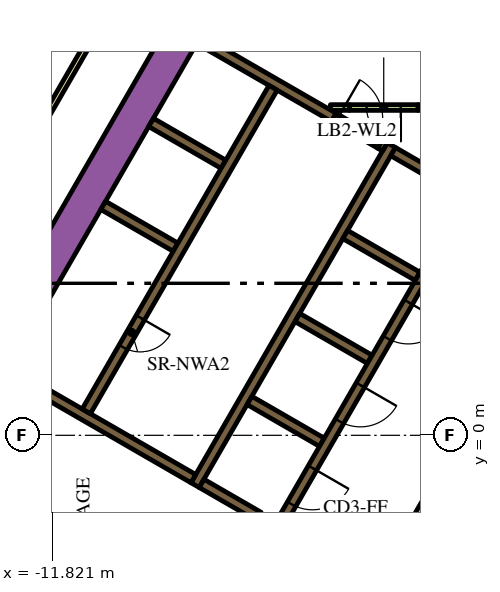
"""IFC4 building model, lengths in metres.
Left out: names, types, materials, properties, quantities, classifications, styles, units other than length and angle.
Written with IfcOpenShell. Run it as: python <this file> out.ifc"""

import sys

from ifc_helpers import new_model, si_unit, direction, frame, frame_2d, origin, place, context, subcontext, project, spatial, polyline, rectangle, outline, extrude, element, fill, save


model = new_model("IFC4")
c1 = context("Model", 3, precision=1e-05, world=origin(), true_north=direction((0.0, 1.0)))
c2 = subcontext(c1, "Body", "Model", "MODEL_VIEW")
j1 = project(units=[si_unit("LENGTHUNIT", "METRE"), si_unit("PLANEANGLEUNIT", "RADIAN")], contexts=[c1])
p1 = place(None, origin())
s1 = spatial("IfcSite", under=j1, at=p1, CompositionType="ELEMENT")
p2 = place(p1, origin())
s2 = spatial("IfcBuilding", under=s1, at=p2, CompositionType="ELEMENT")
p3 = place(p2, frame((0.0, 0.0, 70.5)))
s3 = spatial("IfcBuildingStorey", under=s2, at=p3, CompositionType="ELEMENT", Elevation=70.5)
p4 = place(p3, frame((-15.36, -1.503, 0.0), z_axis=(0.0, 0.0, 1.0), x_axis=(0.50000389221, 0.866023156604, 0.0)))
e1 = element("IfcWall", 1, at=p4, inside=s3, PredefinedType="SOLIDWALL", context=c2, shape_type="SweptSolid", body=[
    extrude(rectangle(XDim=21.0, YDim=0.9, at=frame_2d((10.5, 0.0))), origin(), (0.0, 0.0, 1.0), 3.9),
])
p5 = place(p3, frame((-8.06, -1.311, 0.0), z_axis=(0.0, 0.0, 1.0), x_axis=(0.50000273126, 0.866023826885, 0.0)))
e2 = element("IfcWall", 2, at=p5, inside=s3, PredefinedType="SOLIDWALL", context=c2, shape_type="SweptSolid", body=[
    extrude(rectangle(XDim=10.33, YDim=0.25, at=frame_2d((5.165, 0.0))), origin(), (0.0, 0.0, 1.0), 3.9),
])
p6 = place(p3, frame((-1.647, 6.771, 0.0), z_axis=(0.0, 0.0, 1.0), x_axis=(-0.865971728693, 0.500092956464, 0.0)))
e3 = element("IfcWall", 3, at=p6, inside=s3, PredefinedType="SOLIDWALL", context=c2, shape_type="SweptSolid", body=[
    extrude(rectangle(XDim=1.388, YDim=0.25, at=frame_2d((0.694, 0.0))), origin(), (0.0, 0.0, 1.0), 3.9),
])
for number, where, z_axis, x_axis in (
    (4, (-2.204, 4.182, 0.0), (0.0, 0.0, 1.0), (-0.866, 0.5, 0.0)),
    (5, (-5.369, 3.1, 0.0), (0.0, 0.0, 1.0), (0.866, -0.5, 0.0)),
    (6, (-4.724, -0.182, 0.0), (0.0, 0.0, 1.0), (-0.866, 0.5, 0.0)),
):
    element("IfcWall", number, at=place(p3, frame(where, z_axis=z_axis, x_axis=x_axis)), inside=s3, PredefinedType="SOLIDWALL", context=c2, shape_type="SweptSolid", body=[
        extrude(rectangle(XDim=2.2, YDim=0.25, at=frame_2d((1.1, 0.0))), origin(), (0.0, 0.0, 1.0), 3.9),
    ])
p7 = place(p3, frame((-7.889, -1.265, 0.0), z_axis=(0.0, 0.0, 1.0), x_axis=(0.865986741702, -0.500066958712, 0.0)))
e7 = element("IfcWall", 7, at=p7, inside=s3, PredefinedType="SOLIDWALL", context=c2, shape_type="SweptSolid", body=[
    extrude(rectangle(XDim=1.738, YDim=0.25, at=frame_2d((0.869, 0.0))), origin(), (0.0, 0.0, 1.0), 3.9),
])
p8 = place(p3, frame((-8.106, -1.14, 0.0), z_axis=(0.0, 0.0, 1.0), x_axis=(-0.866000643155, 0.500042884217, 0.0)))
e8 = element("IfcWall", 8, at=p8, inside=s3, PredefinedType="SOLIDWALL", context=c2, shape_type="SweptSolid", body=[
    extrude(rectangle(XDim=5.65, YDim=0.25, at=frame_2d((2.825, 0.0))), origin(), (0.0, 0.0, 1.0), 3.9),
])
p9 = place(p3, origin())
e9 = element("IfcWall", 9, at=p9, inside=s3, PredefinedType="SOLIDWALL", context=c2, shape_type="SweptSolid", body=[
    extrude(outline(polyline([(-3.128, 7.481), (-3.259, 7.557), (-3.134, 7.773), (-3.003, 7.698), (-3.128, 7.481)])), origin(), (0.0, 0.0, 1.0), 3.9),
])
for number, where, z_axis, x_axis in (
    (10, (-8.574, 4.95, 0.0), (0.0, 0.0, 1.0), (-0.866, 0.5, 0.0)),
    (11, (-7.314, 7.132, 0.0), (0.0, 0.0, 1.0), (-0.866, 0.5, 0.0)),
):
    element("IfcWall", number, at=place(p3, frame(where, z_axis=z_axis, x_axis=x_axis)), inside=s3, PredefinedType="SOLIDWALL", context=c2, shape_type="SweptSolid", body=[
        extrude(rectangle(XDim=2.2, YDim=0.25, at=frame_2d((1.1, 0.0))), origin(), (0.0, 0.0, 1.0), 3.9),
    ])
p10 = place(p3, frame((-7.959, 10.415, 0.0), z_axis=(0.0, 0.0, 1.0), x_axis=(0.866020958405, -0.500007699544, 0.0)))
e12 = element("IfcWall", 12, at=p10, inside=s3, PredefinedType="SOLIDWALL", context=c2, shape_type="SweptSolid", body=[
    extrude(rectangle(XDim=4.1, YDim=0.25, at=frame_2d((2.05, 0.0))), origin(), (0.0, 0.0, 1.0), 3.9),
])
p11 = place(p3, frame((-3.147, -3.718, 0.0), z_axis=(0.0, 0.0, 1.0), x_axis=(0.500010131483, 0.866019554291, 0.0)))
e13 = element("IfcWall", 13, at=p11, inside=s3, PredefinedType="PARTITIONING", context=c2, shape_type="SweptSolid", body=[
    extrude(rectangle(XDim=3.894, YDim=0.15, at=frame_2d((1.947, 0.0))), origin(), (0.0, 0.0, 1.0), 2.75),
])
p12 = place(p3, frame((-3.997, 8.625, 0.0), z_axis=(0.0, 0.0, 1.0), x_axis=(-1.0, 0.0, 0.0)))
e14 = element("IfcWall", 14, at=p12, inside=s3, PredefinedType="PARTITIONING", context=c2, shape_type="SweptSolid", body=[
    extrude(rectangle(XDim=0.502, YDim=0.15, at=frame_2d((0.251, 0.0))), origin(), (0.0, 0.0, 1.0), 2.75),
])
p13 = place(p3, frame((-2.196, 8.625, 0.0), z_axis=(0.0, 0.0, 1.0), x_axis=(1.0, 0.0, 0.0)))
e15 = element("IfcWall", 15, at=p13, inside=s3, PredefinedType="PARTITIONING", context=c2, shape_type="SweptSolid", body=[
    extrude(rectangle(XDim=1.146, YDim=0.15, at=frame_2d((0.573, 0.0))), origin(), (0.0, 0.0, 1.0), 2.75),
])
p14 = place(p3, frame((-6.008, 9.144, 0.0), z_axis=(0.0, 0.0, 1.0), x_axis=(-0.500006956611, -0.866021387346, 0.0)))
e16 = element("IfcWall", 16, at=p14, inside=s3, PredefinedType="SOLIDWALL", context=c2, shape_type="SweptSolid", body=[
    extrude(rectangle(XDim=9.83, YDim=0.25, at=frame_2d((4.915, 0.0))), origin(), (0.0, 0.0, 1.0), 3.9),
])
p15 = place(p14, frame((6.985, 0.0, 0.0)))
e17 = element("IfcOpeningElement", 17, at=p15, cuts=e16, PredefinedType="OPENING", context=c2, shape_type="SweptSolid", body=[
    extrude(rectangle(XDim=0.9, YDim=2.1, at=frame_2d((0.45, 1.05))), frame((0.0, 0.135, 0.0), z_axis=(0.0, -1.0, 0.0), x_axis=(1.0, 0.0, 0.0)), (0.0, 0.0, 1.0), 0.27),
])
p16 = place(p3, frame((-0.898, 6.194, 0.0), z_axis=(0.0, 0.0, 1.0), x_axis=(-0.499996202215, -0.866027596426, 0.0)))
e18 = element("IfcWall", 18, at=p16, inside=s3, PredefinedType="SOLIDWALL", context=c2, shape_type="SweptSolid", body=[
    extrude(rectangle(XDim=9.83, YDim=0.25, at=frame_2d((4.915, 0.0))), origin(), (0.0, 0.0, 1.0), 3.9),
])
p17 = place(p16, frame((0.585, 0.0, 0.0)))
e19 = element("IfcOpeningElement", 19, at=p17, cuts=e18, PredefinedType="OPENING", context=c2, shape_type="SweptSolid", body=[
    extrude(rectangle(XDim=1.1, YDim=2.1, at=frame_2d((0.55, 1.05))), frame((0.0, 0.135, 0.0), z_axis=(0.0, -1.0, 0.0), x_axis=(1.0, 0.0, 0.0)), (0.0, 0.0, 1.0), 0.27),
])
p18 = place(p16, frame((3.105, 0.0, 0.0)))
e20 = element("IfcOpeningElement", 20, at=p18, cuts=e18, PredefinedType="OPENING", context=c2, shape_type="SweptSolid", body=[
    extrude(rectangle(XDim=1.1, YDim=2.1, at=frame_2d((0.55, 1.05))), frame((0.0, 0.135, 0.0), z_axis=(0.0, -1.0, 0.0), x_axis=(1.0, 0.0, 0.0)), (0.0, 0.0, 1.0), 0.27),
])
p19 = place(p16, frame((5.625, 0.0, 0.0)))
e21 = element("IfcOpeningElement", 21, at=p19, cuts=e18, PredefinedType="OPENING", context=c2, shape_type="SweptSolid", body=[
    extrude(rectangle(XDim=1.1, YDim=2.1, at=frame_2d((0.55, 1.05))), frame((0.0, 0.135, 0.0), z_axis=(0.0, -1.0, 0.0), x_axis=(1.0, 0.0, 0.0)), (0.0, 0.0, 1.0), 0.27),
])
p20 = place(p16, frame((8.145, 0.0, 0.0)))
e22 = element("IfcOpeningElement", 22, at=p20, cuts=e18, PredefinedType="OPENING", context=c2, shape_type="SweptSolid", body=[
    extrude(rectangle(XDim=1.1, YDim=2.1, at=frame_2d((0.55, 1.05))), frame((0.0, 0.135, 0.0), z_axis=(0.0, -1.0, 0.0), x_axis=(1.0, 0.0, 0.0)), (0.0, 0.0, 1.0), 0.27),
])
p21 = place(p3, frame((-2.196, 8.625, 0.0), z_axis=(0.0, 0.0, 1.0), x_axis=(-1.0, 0.0, 0.0)))
e23 = element("IfcWall", 23, at=p21, inside=s3, PredefinedType="PARTITIONING", context=c2, shape_type="SweptSolid", body=[
    extrude(rectangle(XDim=1.8, YDim=0.15, at=frame_2d((0.9, 0.0))), origin(), (0.0, 0.0, 1.0), 2.75),
])
p22 = place(p21, frame((0.45, 0.0, 0.0)))
e24 = element("IfcOpeningElement", 24, at=p22, cuts=e23, PredefinedType="OPENING", context=c2, shape_type="SweptSolid", body=[
    extrude(rectangle(XDim=0.9, YDim=2.1, at=frame_2d((0.45, 1.05))), frame((0.0, 0.085, 0.0), z_axis=(0.0, -1.0, 0.0), x_axis=(1.0, 0.0, 0.0)), (0.0, 0.0, 1.0), 0.17),
])
p23 = place(p3, frame((-4.409, 8.365, 0.0), z_axis=(0.0, 0.0, 1.0), x_axis=(0.866034573852, -0.49998411664, 0.0)))
e25 = element("IfcWall", 25, at=p23, inside=s3, PredefinedType="SOLIDWALL", context=c2, shape_type="SweptSolid", body=[
    extrude(rectangle(XDim=1.4, YDim=0.25, at=frame_2d((0.7, 0.0))), origin(), (0.0, 0.0, 1.0), 3.9),
])
p24 = place(p23, frame((0.1, 0.0, 0.0)))
e26 = element("IfcOpeningElement", 26, at=p24, cuts=e25, PredefinedType="OPENING", context=c2, shape_type="SweptSolid", body=[
    extrude(rectangle(XDim=1.2, YDim=2.1, at=frame_2d((0.6, 1.05))), frame((0.0, 0.135, 0.0), z_axis=(0.0, -1.0, 0.0), x_axis=(1.0, 0.0, 0.0)), (0.0, 0.0, 1.0), 0.27),
])
p25 = place(p3, frame((-19.081, -3.9, 0.0), z_axis=(0.0, 0.0, 1.0), x_axis=(0.499998313975, 0.866026377209, 0.0)))
e27 = element("IfcWall", 27, at=p25, inside=s3, PredefinedType="PARTITIONING", context=c2, shape_type="SweptSolid", body=[
    extrude(rectangle(XDim=25.766, YDim=0.15, at=frame_2d((12.883, 0.0))), origin(), (0.0, 0.0, 1.0), 2.75),
])
p26 = place(p25, frame((24.586, 0.0, 0.0)))
e28 = element("IfcOpeningElement", 28, at=p26, cuts=e27, PredefinedType="OPENING", context=c2, shape_type="SweptSolid", body=[
    extrude(rectangle(XDim=1.0, YDim=2.1, at=frame_2d((0.5, 1.05))), frame((0.0, 0.085, 0.0), z_axis=(0.0, -1.0, 0.0), x_axis=(1.0, 0.0, 0.0)), (0.0, 0.0, 1.0), 0.17),
])
p27 = place(p25, frame((9.948, 0.0, 0.0)))
e29 = element("IfcOpeningElement", 29, at=p27, cuts=e27, PredefinedType="OPENING", context=c2, shape_type="SweptSolid", body=[
    extrude(rectangle(XDim=1.0, YDim=2.1, at=frame_2d((0.5, 1.05))), frame((0.0, 0.085, 0.0), z_axis=(0.0, -1.0, 0.0), x_axis=(1.0, 0.0, 0.0)), (0.0, 0.0, 1.0), 0.17),
])
p28 = place(p25, frame((7.782, 0.0, 0.0)))
e30 = element("IfcOpeningElement", 30, at=p28, cuts=e27, PredefinedType="OPENING", context=c2, shape_type="SweptSolid", body=[
    extrude(rectangle(XDim=0.9, YDim=2.1, at=frame_2d((0.45, 1.05))), frame((0.0, 0.085, 0.0), z_axis=(0.0, -1.0, 0.0), x_axis=(1.0, 0.0, 0.0)), (0.0, 0.0, 1.0), 0.17),
])
p29 = place(p25, frame((4.658, 0.0, 0.0)))
e31 = element("IfcOpeningElement", 31, at=p29, cuts=e27, PredefinedType="OPENING", context=c2, shape_type="SweptSolid", body=[
    extrude(rectangle(XDim=0.9, YDim=2.1, at=frame_2d((0.45, 1.05))), frame((0.0, 0.085, 0.0), z_axis=(0.0, -1.0, 0.0), x_axis=(1.0, 0.0, 0.0)), (0.0, 0.0, 1.0), 0.17),
])
p30 = place(p15, origin())
e32 = element("IfcDoor", 32, at=p30, inside=s3, OperationType="SINGLE_SWING_LEFT", PredefinedType="DOOR", context=c2, shape_type="SweptSolid", body=[
    extrude(rectangle(XDim=0.9, YDim=2.1, at=frame_2d((0.45, 1.05))), frame((0.0, 0.025, 0.0), z_axis=(0.0, -1.0, 0.0), x_axis=(1.0, 0.0, 0.0)), (0.0, 0.0, 1.0), 0.05),
])
fill(e17, e32)
p31 = place(p18, origin())
e33 = element("IfcDoor", 33, at=p31, inside=s3, OperationType="DOUBLE_DOOR_SLIDING", PredefinedType="DOOR", context=c2, shape_type="SweptSolid", body=[
    extrude(rectangle(XDim=1.1, YDim=2.1, at=frame_2d((0.55, 1.05))), frame((0.0, 0.025, 0.0), z_axis=(0.0, -1.0, 0.0), x_axis=(1.0, 0.0, 0.0)), (0.0, 0.0, 1.0), 0.05),
])
fill(e20, e33)
p32 = place(p19, origin())
e34 = element("IfcDoor", 34, at=p32, inside=s3, OperationType="DOUBLE_DOOR_SLIDING", PredefinedType="DOOR", context=c2, shape_type="SweptSolid", body=[
    extrude(rectangle(XDim=1.1, YDim=2.1, at=frame_2d((0.55, 1.05))), frame((0.0, 0.025, 0.0), z_axis=(0.0, -1.0, 0.0), x_axis=(1.0, 0.0, 0.0)), (0.0, 0.0, 1.0), 0.05),
])
fill(e21, e34)
p33 = place(p20, origin())
e35 = element("IfcDoor", 35, at=p33, inside=s3, OperationType="DOUBLE_DOOR_SLIDING", PredefinedType="DOOR", context=c2, shape_type="SweptSolid", body=[
    extrude(rectangle(XDim=1.1, YDim=2.1, at=frame_2d((0.55, 1.05))), frame((0.0, 0.025, 0.0), z_axis=(0.0, -1.0, 0.0), x_axis=(1.0, 0.0, 0.0)), (0.0, 0.0, 1.0), 0.05),
])
fill(e22, e35)
p34 = place(p22, origin())
e36 = element("IfcDoor", 36, at=p34, inside=s3, OperationType="SINGLE_SWING_LEFT", PredefinedType="DOOR", context=c2, shape_type="SweptSolid", body=[
    extrude(rectangle(XDim=0.9, YDim=2.1, at=frame_2d((0.45, 1.05))), frame((0.0, 0.025, 0.0), z_axis=(0.0, -1.0, 0.0), x_axis=(1.0, 0.0, 0.0)), (0.0, 0.0, 1.0), 0.05),
])
fill(e24, e36)
p35 = place(p24, origin())
e37 = element("IfcDoor", 37, at=p35, inside=s3, OperationType="SINGLE_SWING_LEFT", PredefinedType="DOOR", context=c2, shape_type="SweptSolid", body=[
    extrude(rectangle(XDim=1.2, YDim=2.1, at=frame_2d((0.6, 1.05))), frame((0.0, 0.025, 0.0), z_axis=(0.0, -1.0, 0.0), x_axis=(1.0, 0.0, 0.0)), (0.0, 0.0, 1.0), 0.05),
])
fill(e26, e37)
save(model, sys.argv[1])
